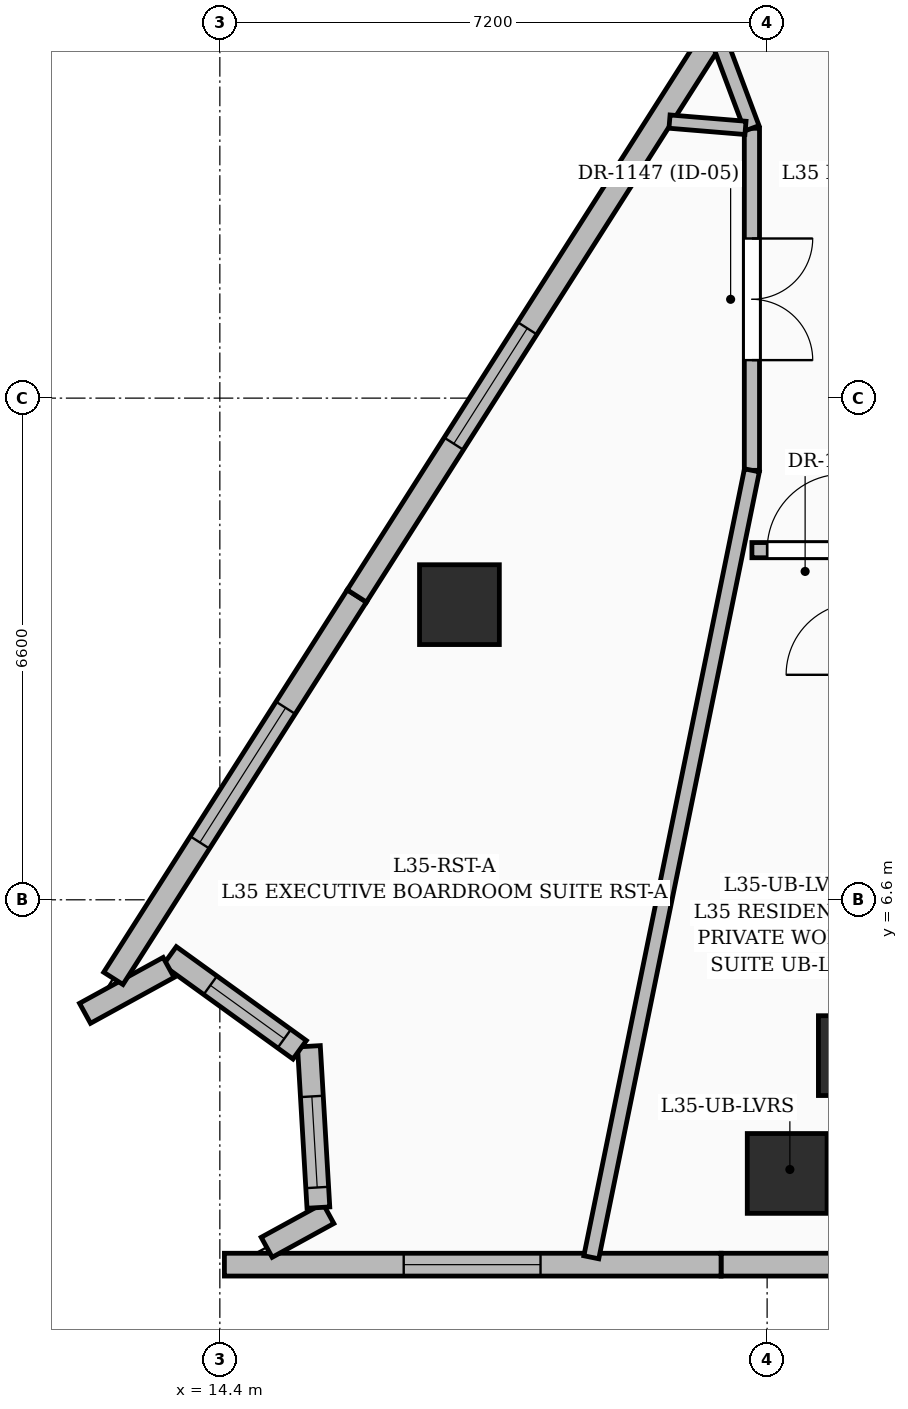
"""IFC4 building model, lengths in metres.
Left out: names, types, materials, properties, quantities, classifications, styles, units other than length and angle.
Written with IfcOpenShell. Run it as: python <this file> out.ifc"""

import sys

from ifc_helpers import new_model, si_unit, direction, frame, frame_2d, origin, origin_2d, place, context, subcontext, project, spatial, rectangle, extrude, element, fill, save


model = new_model("IFC4")
c1 = context("Model", 3, precision=1e-05, world=origin(), true_north=direction((0.0, 1.0)))
c2 = subcontext(c1, "Body", "Model", "MODEL_VIEW")
j1 = project(units=[si_unit("LENGTHUNIT", "METRE"), si_unit("PLANEANGLEUNIT", "RADIAN")], contexts=[c1])
p1 = place(None, origin())
s1 = spatial("IfcSite", under=j1, at=p1, CompositionType="ELEMENT")
p2 = place(p1, origin())
s2 = spatial("IfcBuilding", under=s1, at=p2, CompositionType="ELEMENT")
p3 = place(p2, frame((0.0, 0.0, 139.2)))
s3 = spatial("IfcBuildingStorey", under=s2, at=p3, CompositionType="ELEMENT", Elevation=139.2)
for number, where, z_axis, x_axis in (
    (1, (22.8, 4.55, 0.0), (0.0, 0.0, 1.0), (1.0, 0.0, 0.0)),
    (2, (21.864, 3.0, 0.0), (0.0, 0.0, 1.0), (1.0, 0.0, 0.0)),
    (3, (17.552, 10.483, 0.0), (0.0, 0.0, 1.0), (1.0, 0.0, 0.0)),
):
    element("IfcColumn", number, at=place(p3, frame(where, z_axis=z_axis, x_axis=x_axis)), inside=s3, PredefinedType="COLUMN", context=c2, shape_type="SweptSolid", body=[
        extrude(rectangle(XDim=1.05, YDim=1.05, at=origin_2d()), origin(), (0.0, 0.0, 1.0), 3.6),
    ])
p4 = place(p3, frame((27.248, 1.8, 0.0), z_axis=(0.0, 0.0, 1.0), x_axis=(-1.0, 0.0, 0.0)))
e4 = element("IfcWall", 4, at=p4, inside=s3, PredefinedType="SOLIDWALL", context=c2, shape_type="SweptSolid", body=[
    extrude(rectangle(XDim=6.254, YDim=0.3, at=frame_2d((3.127, 0.0))), origin(), (0.0, 0.0, 1.0), 3.35),
])
p5 = place(p4, frame((1.445, 0.0, 0.55)))
e5 = element("IfcOpeningElement", 5, at=p5, cuts=e4, PredefinedType="OPENING", context=c2, shape_type="SweptSolid", body=[
    extrude(rectangle(XDim=2.1, YDim=2.4, at=frame_2d((1.05, 1.2))), frame((0.0, 0.16, 0.0), z_axis=(0.0, -1.0, 0.0), x_axis=(1.0, 0.0, 0.0)), (0.0, 0.0, 1.0), 0.32),
])
p6 = place(p3, frame((20.994, 1.8, 0.0), z_axis=(0.0, 0.0, 1.0), x_axis=(-1.0, 0.0, 0.0)))
e6 = element("IfcWall", 6, at=p6, inside=s3, PredefinedType="SOLIDWALL", context=c2, shape_type="SweptSolid", body=[
    extrude(rectangle(XDim=6.534, YDim=0.3, at=frame_2d((3.267, 0.0))), origin(), (0.0, 0.0, 1.0), 3.35),
])
p7 = place(p6, frame((2.375, 0.0, 0.6)))
e7 = element("IfcOpeningElement", 7, at=p7, cuts=e6, PredefinedType="OPENING", context=c2, shape_type="SweptSolid", body=[
    extrude(rectangle(XDim=1.8, YDim=2.1, at=frame_2d((0.9, 1.05))), frame((0.0, 0.16, 0.0), z_axis=(0.0, -1.0, 0.0), x_axis=(1.0, 0.0, 0.0)), (0.0, 0.0, 1.0), 0.32),
])
p8 = place(p3, frame((15.016, 2.028, 0.0), z_axis=(0.0, 0.0, 1.0), x_axis=(0.876794471231, 0.48086531921, 0.0)))
e8 = element("IfcWall", 8, at=p8, inside=s3, PredefinedType="SOLIDWALL", context=c2, shape_type="SweptSolid", body=[
    extrude(rectangle(XDim=0.926, YDim=0.3, at=frame_2d((0.463, 0.0))), origin(), (0.0, 0.0, 1.0), 3.35),
])
p9 = place(p3, frame((15.697, 2.551, 0.0), z_axis=(0.0, 0.0, 1.0), x_axis=(-0.058688358982, 0.99827635278, 0.0)))
e9 = element("IfcWall", 9, at=p9, inside=s3, PredefinedType="SOLIDWALL", context=c2, shape_type="SweptSolid", body=[
    extrude(rectangle(XDim=2.126, YDim=0.3, at=frame_2d((1.063, 0.0))), origin(), (0.0, 0.0, 1.0), 3.35),
])
p10 = place(p9, frame((0.265, 0.0, 0.8)))
e10 = element("IfcOpeningElement", 10, at=p10, cuts=e9, PredefinedType="OPENING", context=c2, shape_type="SweptSolid", body=[
    extrude(rectangle(XDim=1.2, YDim=1.8, at=frame_2d((0.6, 0.9))), frame((0.0, 0.16, 0.0), z_axis=(0.0, -1.0, 0.0), x_axis=(1.0, 0.0, 0.0)), (0.0, 0.0, 1.0), 0.32),
])
p11 = place(p3, frame((15.45, 4.627, 0.0), z_axis=(0.0, 0.0, 1.0), x_axis=(-0.810712787228, 0.585444084969, 0.0)))
e11 = element("IfcWall", 11, at=p11, inside=s3, PredefinedType="SOLIDWALL", context=c2, shape_type="SweptSolid", body=[
    extrude(rectangle(XDim=2.11, YDim=0.3, at=frame_2d((1.055, 0.0))), origin(), (0.0, 0.0, 1.0), 3.35),
])
p12 = place(p11, frame((0.25, 0.0, 0.8)))
e12 = element("IfcOpeningElement", 12, at=p12, cuts=e11, PredefinedType="OPENING", context=c2, shape_type="SweptSolid", body=[
    extrude(rectangle(XDim=1.2, YDim=1.8, at=frame_2d((0.6, 0.9))), frame((0.0, 0.16, 0.0), z_axis=(0.0, -1.0, 0.0), x_axis=(1.0, 0.0, 0.0)), (0.0, 0.0, 1.0), 0.32),
])
p13 = place(p3, frame((13.726, 5.71, 0.0), z_axis=(0.0, 0.0, 1.0), x_axis=(-0.876642942611, -0.481141508467, 0.0)))
e13 = element("IfcWall", 13, at=p13, inside=s3, PredefinedType="SOLIDWALL", context=c2, shape_type="SweptSolid", body=[
    extrude(rectangle(XDim=1.254, YDim=0.3, at=frame_2d((0.627, 0.0))), origin(), (0.0, 0.0, 1.0), 3.35),
])
p14 = place(p3, frame((12.999, 5.566, 0.0), z_axis=(0.0, 0.0, 1.0), x_axis=(0.537111210025, 0.843511439202, 0.0)))
e14 = element("IfcWall", 14, at=p14, inside=s3, PredefinedType="SOLIDWALL", context=c2, shape_type="SweptSolid", body=[
    extrude(rectangle(XDim=5.964, YDim=0.3, at=frame_2d((2.982, 0.0))), origin(), (0.0, 0.0, 1.0), 3.35),
])
p15 = place(p14, frame((2.12, 0.0, 0.55)))
e15 = element("IfcOpeningElement", 15, at=p15, cuts=e14, PredefinedType="OPENING", context=c2, shape_type="SweptSolid", body=[
    extrude(rectangle(XDim=2.1, YDim=2.4, at=frame_2d((1.05, 1.2))), frame((0.0, 0.16, 0.0), z_axis=(0.0, -1.0, 0.0), x_axis=(1.0, 0.0, 0.0)), (0.0, 0.0, 1.0), 0.32),
])
p16 = place(p3, frame((16.202, 10.597, 0.0), z_axis=(0.0, 0.0, 1.0), x_axis=(0.537115953095, 0.843508419004, 0.0)))
e16 = element("IfcWall", 16, at=p16, inside=s3, PredefinedType="SOLIDWALL", context=c2, shape_type="SweptSolid", body=[
    extrude(rectangle(XDim=6.569, YDim=0.3, at=frame_2d((3.285, 0.0))), origin(), (0.0, 0.0, 1.0), 3.35),
])
p17 = place(p16, frame((2.375, 0.0, 0.6)))
e17 = element("IfcOpeningElement", 17, at=p17, cuts=e16, PredefinedType="OPENING", context=c2, shape_type="SweptSolid", body=[
    extrude(rectangle(XDim=1.8, YDim=2.1, at=frame_2d((0.9, 1.05))), frame((0.0, 0.16, 0.0), z_axis=(0.0, -1.0, 0.0), x_axis=(1.0, 0.0, 0.0)), (0.0, 0.0, 1.0), 0.32),
])
p18 = place(p3, frame((19.73, 16.138, 0.0), z_axis=(0.0, 0.0, 1.0), x_axis=(0.537099115242, 0.84351914051, 0.0)))
e18 = element("IfcWall", 18, at=p18, inside=s3, PredefinedType="SOLIDWALL", context=c2, shape_type="SweptSolid", body=[
    extrude(rectangle(XDim=6.569, YDim=0.3, at=frame_2d((3.285, 0.0))), origin(), (0.0, 0.0, 1.0), 3.35),
])
p19 = place(p18, frame((2.85, 0.0, 0.55)))
e19 = element("IfcOpeningElement", 19, at=p19, cuts=e18, PredefinedType="OPENING", context=c2, shape_type="SweptSolid", body=[
    extrude(rectangle(XDim=1.6, YDim=2.2, at=frame_2d((0.8, 1.1))), frame((0.0, 0.16, 0.0), z_axis=(0.0, -1.0, 0.0), x_axis=(1.0, 0.0, 0.0)), (0.0, 0.0, 1.0), 0.32),
])
p20 = place(p3, frame((21.4, 16.75, 0.0), z_axis=(0.0, 0.0, 1.0), x_axis=(0.0, -1.0, 0.0)))
e20 = element("IfcWall", 20, at=p20, inside=s3, PredefinedType="PARTITIONING", context=c2, shape_type="SweptSolid", body=[
    extrude(rectangle(XDim=4.5, YDim=0.2, at=frame_2d((2.25, 0.0))), origin(), (0.0, 0.0, 1.0), 2.57),
])
p21 = place(p20, frame((1.45, 0.0, 0.0)))
e21 = element("IfcOpeningElement", 21, at=p21, cuts=e20, PredefinedType="OPENING", context=c2, shape_type="SweptSolid", body=[
    extrude(rectangle(XDim=1.6, YDim=2.3, at=frame_2d((0.8, 1.15))), frame((0.0, 0.11, 0.0), z_axis=(0.0, -1.0, 0.0), x_axis=(1.0, 0.0, 0.0)), (0.0, 0.0, 1.0), 0.22),
])
p22 = place(p3, frame((21.4, 11.2, 0.0), z_axis=(0.0, 0.0, 1.0), x_axis=(1.0, 0.0, 0.0)))
e22 = element("IfcWall", 22, at=p22, inside=s3, PredefinedType="PARTITIONING", context=c2, shape_type="SweptSolid", body=[
    extrude(rectangle(XDim=1.4, YDim=0.2, at=frame_2d((0.7, 0.0))), origin(), (0.0, 0.0, 1.0), 2.712),
])
p23 = place(p22, frame((0.2, 0.0, 0.0)))
e23 = element("IfcOpeningElement", 23, at=p23, cuts=e22, PredefinedType="OPENING", context=c2, shape_type="SweptSolid", body=[
    extrude(rectangle(XDim=1.0, YDim=2.2, at=frame_2d((0.5, 1.1))), frame((0.0, 0.11, 0.0), z_axis=(0.0, -1.0, 0.0), x_axis=(1.0, 0.0, 0.0)), (0.0, 0.0, 1.0), 0.22),
])
p24 = place(p3, frame((29.315, 17.753, 0.0), z_axis=(0.0, 0.0, 1.0), x_axis=(-0.999298310167, 0.037455137138, 0.0)))
e24 = element("IfcWall", 24, at=p24, inside=s3, PredefinedType="PARTITIONING", context=c2, shape_type="SweptSolid", body=[
    extrude(rectangle(XDim=8.226, YDim=0.2, at=frame_2d((4.113, 0.0))), origin(), (0.0, 0.0, 1.0), 2.393),
])
p25 = place(p24, frame((3.287, 0.0, 0.0)))
e25 = element("IfcOpeningElement", 25, at=p25, cuts=e24, PredefinedType="OPENING", context=c2, shape_type="SweptSolid", body=[
    extrude(rectangle(XDim=1.6, YDim=2.3, at=frame_2d((0.8, 1.15))), frame((0.0, 0.11, 0.0), z_axis=(0.0, -1.0, 0.0), x_axis=(1.0, 0.0, 0.0)), (0.0, 0.0, 1.0), 0.22),
])
p26 = place(p3, frame((20.987, 17.853, 0.0), z_axis=(0.0, 0.0, 1.0), x_axis=(0.350532728214, -0.936550482596, 0.0)))
e26 = element("IfcWall", 26, at=p26, inside=s3, PredefinedType="PARTITIONING", context=c2, shape_type="SweptSolid", body=[
    extrude(rectangle(XDim=1.178, YDim=0.2, at=frame_2d((0.589, 0.0))), origin(), (0.0, 0.0, 1.0), 2.57),
])
p27 = place(p3, frame((19.287, 1.897, 0.0), z_axis=(0.0, 0.0, 1.0), x_axis=(0.19995367442, 0.979805352142, 0.0)))
e27 = element("IfcWall", 27, at=p27, inside=s3, PredefinedType="PARTITIONING", context=c2, shape_type="SweptSolid", body=[
    extrude(rectangle(XDim=10.566, YDim=0.2, at=frame_2d((5.283, 0.0))), origin(), (0.0, 0.0, 1.0), 2.393),
])
p28 = place(p3, frame((21.315, 16.755, 0.0), z_axis=(0.0, 0.0, 1.0), x_axis=(-0.996607611453, 0.082299871163, 0.0)))
e28 = element("IfcWall", 28, at=p28, inside=s3, PredefinedType="PARTITIONING", context=c2, shape_type="SweptSolid", body=[
    extrude(rectangle(XDim=1.003, YDim=0.175, at=frame_2d((0.501, 0.0))), origin(), (0.0, 0.0, 1.0), 2.57),
])
p29 = place(p7, origin())
e29 = element("IfcWindow", 29, at=p29, inside=s3, PartitioningType="SINGLE_PANEL", PredefinedType="WINDOW", context=c2, shape_type="SweptSolid", body=[
    extrude(rectangle(XDim=1.8, YDim=2.1, at=frame_2d((0.9, 1.05))), frame((0.0, 0.03, 0.0), z_axis=(0.0, -1.0, 0.0), x_axis=(1.0, 0.0, 0.0)), (0.0, 0.0, 1.0), 0.06),
])
fill(e7, e29)
p30 = place(p10, origin())
e30 = element("IfcWindow", 30, at=p30, inside=s3, PartitioningType="SINGLE_PANEL", PredefinedType="WINDOW", context=c2, shape_type="SweptSolid", body=[
    extrude(rectangle(XDim=1.2, YDim=1.8, at=frame_2d((0.6, 0.9))), frame((0.0, 0.03, 0.0), z_axis=(0.0, -1.0, 0.0), x_axis=(1.0, 0.0, 0.0)), (0.0, 0.0, 1.0), 0.06),
])
fill(e10, e30)
p31 = place(p12, origin())
e31 = element("IfcWindow", 31, at=p31, inside=s3, PartitioningType="SINGLE_PANEL", PredefinedType="WINDOW", context=c2, shape_type="SweptSolid", body=[
    extrude(rectangle(XDim=1.2, YDim=1.8, at=frame_2d((0.6, 0.9))), frame((0.0, 0.03, 0.0), z_axis=(0.0, -1.0, 0.0), x_axis=(1.0, 0.0, 0.0)), (0.0, 0.0, 1.0), 0.06),
])
fill(e12, e31)
p32 = place(p15, origin())
e32 = element("IfcWindow", 32, at=p32, inside=s3, PartitioningType="SINGLE_PANEL", PredefinedType="WINDOW", context=c2, shape_type="SweptSolid", body=[
    extrude(rectangle(XDim=2.1, YDim=2.4, at=frame_2d((1.05, 1.2))), frame((0.0, 0.03, 0.0), z_axis=(0.0, -1.0, 0.0), x_axis=(1.0, 0.0, 0.0)), (0.0, 0.0, 1.0), 0.06),
])
fill(e15, e32)
p33 = place(p17, origin())
e33 = element("IfcWindow", 33, at=p33, inside=s3, PartitioningType="SINGLE_PANEL", PredefinedType="WINDOW", context=c2, shape_type="SweptSolid", body=[
    extrude(rectangle(XDim=1.8, YDim=2.1, at=frame_2d((0.9, 1.05))), frame((0.0, 0.03, 0.0), z_axis=(0.0, -1.0, 0.0), x_axis=(1.0, 0.0, 0.0)), (0.0, 0.0, 1.0), 0.06),
])
fill(e17, e33)
p34 = place(p21, origin())
e34 = element("IfcDoor", 34, at=p34, inside=s3, OperationType="DOUBLE_DOOR_SINGLE_SWING", PredefinedType="DOOR", context=c2, shape_type="SweptSolid", body=[
    extrude(rectangle(XDim=1.6, YDim=2.3, at=frame_2d((0.8, 1.15))), frame((0.0, 0.025, 0.0), z_axis=(0.0, -1.0, 0.0), x_axis=(1.0, 0.0, 0.0)), (0.0, 0.0, 1.0), 0.05),
])
fill(e21, e34)
p35 = place(p23, origin())
e35 = element("IfcDoor", 35, at=p35, inside=s3, OperationType="SINGLE_SWING_RIGHT", PredefinedType="DOOR", context=c2, shape_type="SweptSolid", body=[
    extrude(rectangle(XDim=1.0, YDim=2.2, at=frame_2d((0.5, 1.1))), frame((0.0, 0.025, 0.0), z_axis=(0.0, -1.0, 0.0), x_axis=(1.0, 0.0, 0.0)), (0.0, 0.0, 1.0), 0.05),
])
fill(e23, e35)
save(model, sys.argv[1])
